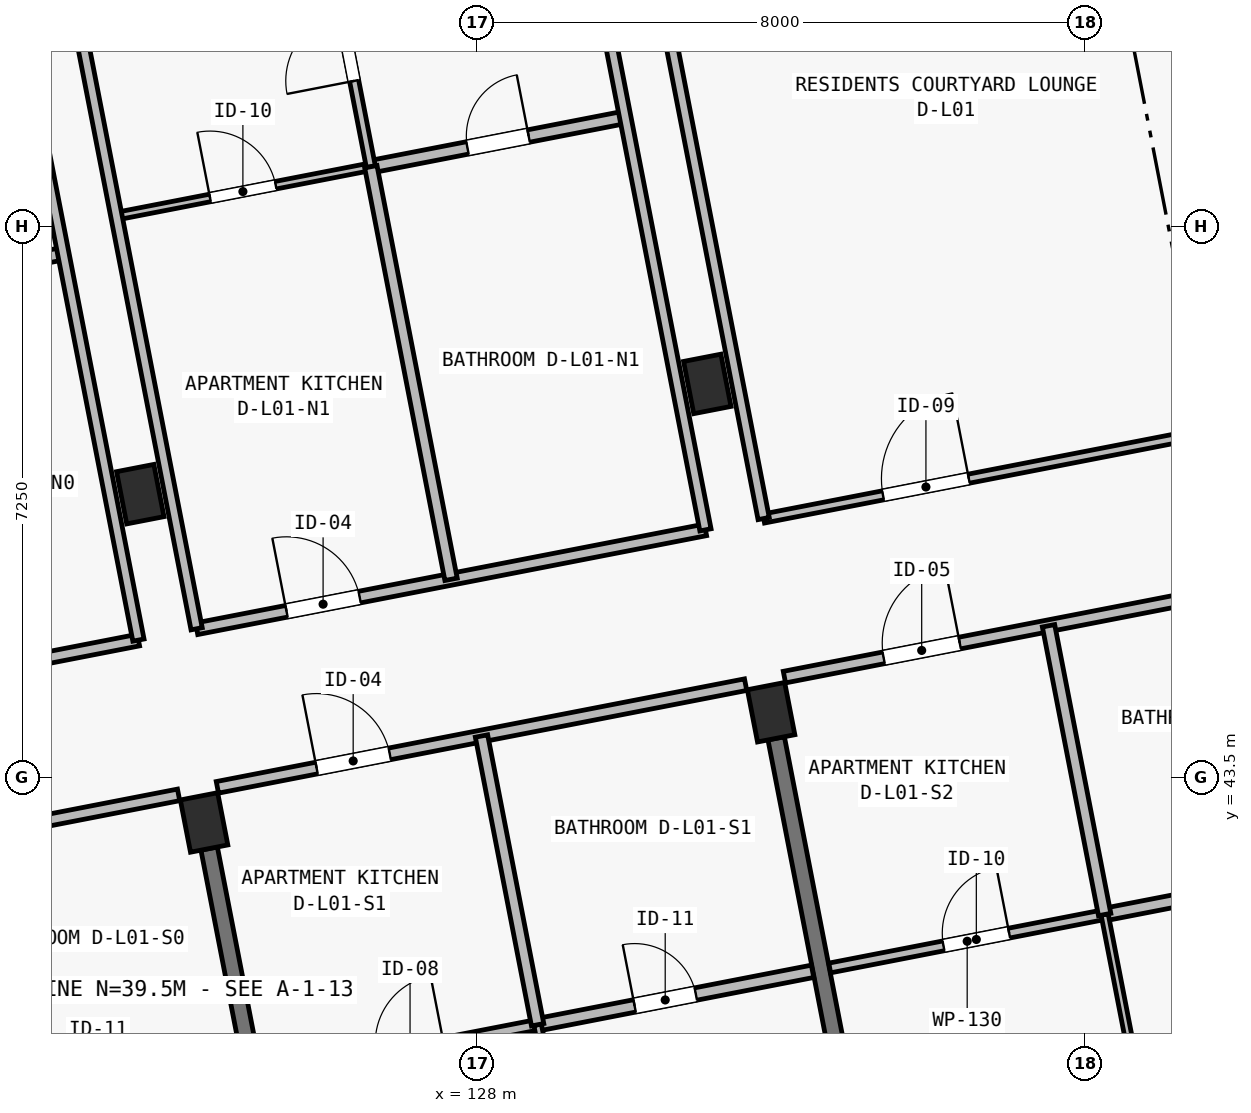
"""IFC4 building model, lengths in metres.
Left out: names, types, materials, properties, quantities, classifications, styles, units other than length and angle.
Written with IfcOpenShell. Run it as: python <this file> out.ifc"""

import sys

from ifc_helpers import new_model, si_unit, direction, frame, frame_2d, origin, origin_2d, place, context, subcontext, project, spatial, rectangle, extrude, element, fill, save


model = new_model("IFC4")
c1 = context("Model", 3, precision=1e-05, world=origin(), true_north=direction((0.0, 1.0)))
c2 = subcontext(c1, "Body", "Model", "MODEL_VIEW")
j1 = project(units=[si_unit("LENGTHUNIT", "METRE"), si_unit("PLANEANGLEUNIT", "RADIAN")], contexts=[c1])
p1 = place(None, origin())
s1 = spatial("IfcSite", under=j1, at=p1, CompositionType="ELEMENT")
p2 = place(p1, origin())
s2 = spatial("IfcBuilding", under=s1, at=p2, CompositionType="ELEMENT")
p3 = place(p2, frame((0.0, 0.0, 4.5)))
s3 = spatial("IfcBuildingStorey", under=s2, at=p3, CompositionType="ELEMENT", Elevation=4.5)
for number, where, z_axis, x_axis in (
    (1, (124.41, 42.91, 0.0), (0.0, 0.0, 1.0), (0.982, 0.191, 0.0)),
    (2, (123.571, 47.23, 0.0), (0.0, 0.0, 1.0), (0.982, 0.191, 0.0)),
    (3, (131.871, 44.361, 0.0), (0.0, 0.0, 1.0), (0.982, 0.191, 0.0)),
    (4, (131.031, 48.68, 0.0), (0.0, 0.0, 1.0), (0.982, 0.191, 0.0)),
):
    element("IfcColumn", number, at=place(p3, frame(where, z_axis=z_axis, x_axis=x_axis)), inside=s3, PredefinedType="COLUMN", context=c2, shape_type="SweptSolid", body=[
        extrude(rectangle(XDim=0.5, YDim=0.7, at=origin_2d()), origin(), (0.0, 0.0, 1.0), 3.9),
    ])
for number, where, z_axis, x_axis in (
    (5, (125.794, 35.794, -0.25), (0.0, 0.0, 1.0), (-0.191, 0.982, 0.0)),
    (6, (133.254, 37.244, -0.25), (0.0, 0.0, 1.0), (-0.191, 0.982, 0.0)),
):
    element("IfcWall", number, at=place(p3, frame(where, z_axis=z_axis, x_axis=x_axis)), inside=s3, PredefinedType="SHEAR", context=c2, shape_type="SweptSolid", body=[
        extrude(rectangle(XDim=6.9, YDim=0.22, at=frame_2d((3.45, 0.0))), origin(), (0.0, 0.0, 1.0), 3.4),
    ])
p4 = place(p3, frame((116.482, 41.797, 0.0), z_axis=(0.0, 0.0, 1.0), x_axis=(0.981629678105, 0.190796161028, 0.0)))
e7 = element("IfcWall", 7, at=p4, inside=s3, PredefinedType="PARTITIONING", context=c2, shape_type="SweptSolid", body=[
    extrude(rectangle(XDim=7.735, YDim=0.155, at=frame_2d((3.868, 0.0))), origin(), (0.0, 0.0, 1.0), 3.62),
])
p5 = place(p4, frame((1.985, 0.0, 0.0)))
e8 = element("IfcOpeningElement", 8, at=p5, cuts=e7, PredefinedType="OPENING", context=c2, shape_type="SweptSolid", body=[
    extrude(rectangle(XDim=1.02, YDim=2.2, at=frame_2d((0.51, 1.1))), frame((0.0, 0.093, 0.0), z_axis=(0.0, -1.0, 0.0), x_axis=(1.0, 0.0, 0.0)), (0.0, 0.0, 1.0), 0.185),
])
p6 = place(p3, frame((124.585, 43.372, 0.0), z_axis=(0.0, 0.0, 1.0), x_axis=(0.9816234647, 0.190828125677, 0.0)))
e9 = element("IfcWall", 9, at=p6, inside=s3, PredefinedType="PARTITIONING", context=c2, shape_type="SweptSolid", body=[
    extrude(rectangle(XDim=7.08, YDim=0.155, at=frame_2d((3.54, 0.0))), origin(), (0.0, 0.0, 1.0), 3.62),
])
p7 = place(p6, frame((1.33, 0.0, 0.0)))
e10 = element("IfcOpeningElement", 10, at=p7, cuts=e9, PredefinedType="OPENING", context=c2, shape_type="SweptSolid", body=[
    extrude(rectangle(XDim=0.98, YDim=2.15, at=frame_2d((0.49, 1.075))), frame((0.0, 0.093, 0.0), z_axis=(0.0, -1.0, 0.0), x_axis=(1.0, 0.0, 0.0)), (0.0, 0.0, 1.0), 0.185),
])
p8 = place(p3, frame((125.181, 39.546, 0.0), z_axis=(0.0, 0.0, 1.0), x_axis=(0.981626422232, 0.190812911449, 0.0)))
e11 = element("IfcWall", 11, at=p8, inside=s3, PredefinedType="PARTITIONING", context=c2, shape_type="SweptSolid", body=[
    extrude(rectangle(XDim=3.685, YDim=0.14, at=frame_2d((1.842, 0.0))), origin(), (0.0, 0.0, 1.0), 3.62),
])
p9 = place(p8, frame((1.525, 0.0, 0.0)))
e12 = element("IfcOpeningElement", 12, at=p9, cuts=e11, PredefinedType="OPENING", context=c2, shape_type="SweptSolid", body=[
    extrude(rectangle(XDim=0.9, YDim=2.1, at=frame_2d((0.45, 1.05))), frame((0.0, 0.085, 0.0), z_axis=(0.0, -1.0, 0.0), x_axis=(1.0, 0.0, 0.0)), (0.0, 0.0, 1.0), 0.17),
])
p10 = place(p3, frame((128.799, 40.249, 0.0), z_axis=(0.0, 0.0, 1.0), x_axis=(0.981628834294, 0.190800502313, 0.0)))
e13 = element("IfcWall", 13, at=p10, inside=s3, PredefinedType="PLUMBINGWALL", context=c2, shape_type="SweptSolid", body=[
    extrude(rectangle(XDim=3.685, YDim=0.165, at=frame_2d((1.843, 0.0))), origin(), (0.0, 0.0, 1.0), 3.62),
])
p11 = place(p10, frame((1.3, 0.0, 0.0)))
e14 = element("IfcOpeningElement", 14, at=p11, cuts=e13, PredefinedType="OPENING", context=c2, shape_type="SweptSolid", body=[
    extrude(rectangle(XDim=0.82, YDim=2.08, at=frame_2d((0.41, 1.04))), frame((0.0, 0.097, 0.0), z_axis=(0.0, -1.0, 0.0), x_axis=(1.0, 0.0, 0.0)), (0.0, 0.0, 1.0), 0.195),
])
p12 = place(p3, frame((129.665, 35.792, 0.0), z_axis=(0.0, 0.0, 1.0), x_axis=(-0.190849508215, 0.981619307682, 0.0)))
e15 = element("IfcWall", 15, at=p12, inside=s3, PredefinedType="PARTITIONING", context=c2, shape_type="SweptSolid", body=[
    extrude(rectangle(XDim=4.54, YDim=0.1, at=frame_2d((2.27, 0.0))), origin(), (0.0, 0.0, 1.0), 3.62),
])
p13 = place(p12, frame((1.35, 0.0, 0.0)))
e16 = element("IfcOpeningElement", 16, at=p13, cuts=e15, PredefinedType="OPENING", context=c2, shape_type="SweptSolid", body=[
    extrude(rectangle(XDim=0.88, YDim=2.1, at=frame_2d((0.44, 1.05))), frame((0.0, 0.065, 0.0), z_axis=(0.0, -1.0, 0.0), x_axis=(1.0, 0.0, 0.0)), (0.0, 0.0, 1.0), 0.13),
])
p14 = place(p3, frame((128.799, 40.249, 0.0), z_axis=(0.0, 0.0, 1.0), x_axis=(-0.190775098069, 0.981633771809, 0.0)))
e17 = element("IfcWall", 17, at=p14, inside=s3, PredefinedType="PLUMBINGWALL", context=c2, shape_type="SweptSolid", body=[
    extrude(rectangle(XDim=3.87, YDim=0.165, at=frame_2d((1.935, 0.0))), origin(), (0.0, 0.0, 1.0), 3.62),
])
p15 = place(p3, frame((132.046, 44.823, 0.0), z_axis=(0.0, 0.0, 1.0), x_axis=(0.9816234647, 0.190828125677, 0.0)))
e18 = element("IfcWall", 18, at=p15, inside=s3, PredefinedType="PARTITIONING", context=c2, shape_type="SweptSolid", body=[
    extrude(rectangle(XDim=7.08, YDim=0.155, at=frame_2d((3.54, 0.0))), origin(), (0.0, 0.0, 1.0), 3.62),
])
p16 = place(p15, frame((1.33, 0.0, 0.0)))
e19 = element("IfcOpeningElement", 19, at=p16, cuts=e18, PredefinedType="OPENING", context=c2, shape_type="SweptSolid", body=[
    extrude(rectangle(XDim=1.02, YDim=2.2, at=frame_2d((0.51, 1.1))), frame((0.0, 0.093, 0.0), z_axis=(0.0, -1.0, 0.0), x_axis=(1.0, 0.0, 0.0)), (0.0, 0.0, 1.0), 0.185),
])
p17 = place(p3, frame((132.642, 40.996, 0.0), z_axis=(0.0, 0.0, 1.0), x_axis=(0.981626422232, 0.190812911449, 0.0)))
e20 = element("IfcWall", 20, at=p17, inside=s3, PredefinedType="PARTITIONING", context=c2, shape_type="SweptSolid", body=[
    extrude(rectangle(XDim=3.685, YDim=0.13, at=frame_2d((1.842, 0.0))), origin(), (0.0, 0.0, 1.0), 3.62),
])
p18 = place(p17, frame((1.525, 0.0, 0.0)))
e21 = element("IfcOpeningElement", 21, at=p18, cuts=e20, PredefinedType="OPENING", context=c2, shape_type="SweptSolid", body=[
    extrude(rectangle(XDim=0.88, YDim=2.1, at=frame_2d((0.44, 1.05))), frame((0.0, 0.08, 0.0), z_axis=(0.0, -1.0, 0.0), x_axis=(1.0, 0.0, 0.0)), (0.0, 0.0, 1.0), 0.16),
])
p19 = place(p3, frame((136.259, 41.699, 0.0), z_axis=(0.0, 0.0, 1.0), x_axis=(0.981628834294, 0.190800502313, 0.0)))
e22 = element("IfcWall", 22, at=p19, inside=s3, PredefinedType="PLUMBINGWALL", context=c2, shape_type="SweptSolid", body=[
    extrude(rectangle(XDim=3.685, YDim=0.165, at=frame_2d((1.843, 0.0))), origin(), (0.0, 0.0, 1.0), 3.62),
])
p20 = place(p19, frame((1.3, 0.0, 0.0)))
e23 = element("IfcOpeningElement", 23, at=p20, cuts=e22, PredefinedType="OPENING", context=c2, shape_type="SweptSolid", body=[
    extrude(rectangle(XDim=0.82, YDim=2.08, at=frame_2d((0.41, 1.04))), frame((0.0, 0.097, 0.0), z_axis=(0.0, -1.0, 0.0), x_axis=(1.0, 0.0, 0.0)), (0.0, 0.0, 1.0), 0.195),
])
p21 = place(p3, frame((137.125, 37.242, 0.0), z_axis=(0.0, 0.0, 1.0), x_axis=(-0.190787619192, 0.981631338316, 0.0)))
e24 = element("IfcWall", 24, at=p21, inside=s3, PredefinedType="PARTITIONING", context=c2, shape_type="SweptSolid", body=[
    extrude(rectangle(XDim=4.54, YDim=0.095, at=frame_2d((2.27, 0.0))), origin(), (0.0, 0.0, 1.0), 3.62),
])
p22 = place(p21, frame((1.35, 0.0, 0.0)))
e25 = element("IfcOpeningElement", 25, at=p22, cuts=e24, PredefinedType="OPENING", context=c2, shape_type="SweptSolid", body=[
    extrude(rectangle(XDim=0.9, YDim=2.1, at=frame_2d((0.45, 1.05))), frame((0.0, 0.062, 0.0), z_axis=(0.0, -1.0, 0.0), x_axis=(1.0, 0.0, 0.0)), (0.0, 0.0, 1.0), 0.125),
])
p23 = place(p3, frame((136.259, 41.699, 0.0), z_axis=(0.0, 0.0, 1.0), x_axis=(-0.190835887914, 0.981621955686, 0.0)))
e26 = element("IfcWall", 26, at=p23, inside=s3, PredefinedType="PLUMBINGWALL", context=c2, shape_type="SweptSolid", body=[
    extrude(rectangle(XDim=3.87, YDim=0.165, at=frame_2d((1.935, 0.0))), origin(), (0.0, 0.0, 1.0), 3.62),
])
p24 = place(p3, frame((116.852, 44.009, 0.0), z_axis=(0.0, 0.0, 1.0), x_axis=(0.981629173664, 0.190798756314, 0.0)))
e27 = element("IfcWall", 27, at=p24, inside=s3, PredefinedType="PARTITIONING", context=c2, shape_type="SweptSolid", body=[
    extrude(rectangle(XDim=6.82, YDim=0.155, at=frame_2d((3.41, 0.0))), origin(), (0.0, 0.0, 1.0), 3.62),
])
p25 = place(p24, frame((1.205, 0.0, 0.0)))
e28 = element("IfcOpeningElement", 28, at=p25, cuts=e27, PredefinedType="OPENING", context=c2, shape_type="SweptSolid", body=[
    extrude(rectangle(XDim=1.02, YDim=2.2, at=frame_2d((0.51, 1.1))), frame((0.0, 0.093, 0.0), z_axis=(0.0, -1.0, 0.0), x_axis=(1.0, 0.0, 0.0)), (0.0, 0.0, 1.0), 0.185),
])
p26 = place(p3, frame((119.211, 49.744, 0.0), z_axis=(0.0, 0.0, 1.0), x_axis=(0.981629173664, 0.190798756314, 0.0)))
e29 = element("IfcWall", 29, at=p26, inside=s3, PredefinedType="PLUMBINGWALL", context=c2, shape_type="SweptSolid", body=[
    extrude(rectangle(XDim=3.41, YDim=0.165, at=frame_2d((1.705, 0.0))), origin(), (0.0, 0.0, 1.0), 3.62),
])
p27 = place(p26, frame((1.295, 0.0, 0.0)))
e30 = element("IfcOpeningElement", 30, at=p27, cuts=e29, PredefinedType="OPENING", context=c2, shape_type="SweptSolid", body=[
    extrude(rectangle(XDim=0.82, YDim=2.08, at=frame_2d((0.41, 1.04))), frame((0.0, 0.097, 0.0), z_axis=(0.0, -1.0, 0.0), x_axis=(1.0, 0.0, 0.0)), (0.0, 0.0, 1.0), 0.195),
])
p28 = place(p3, frame((123.547, 45.31, 0.0), z_axis=(0.0, 0.0, 1.0), x_axis=(-0.190809410863, 0.981627102685, 0.0)))
e31 = element("IfcWall", 31, at=p28, inside=s3, PredefinedType="PARTITIONING", context=c2, shape_type="SweptSolid", body=[
    extrude(rectangle(XDim=9.87, YDim=0.15, at=frame_2d((4.935, 0.0))), origin(), (0.0, 0.0, 1.0), 3.62),
])
p29 = place(p3, frame((124.312, 45.459, 0.0), z_axis=(0.0, 0.0, 1.0), x_axis=(0.981627870431, 0.190805461121, 0.0)))
e32 = element("IfcWall", 32, at=p29, inside=s3, PredefinedType="PARTITIONING", context=c2, shape_type="SweptSolid", body=[
    extrude(rectangle(XDim=6.82, YDim=0.155, at=frame_2d((3.41, 0.0))), origin(), (0.0, 0.0, 1.0), 3.62),
])
p30 = place(p29, frame((1.205, 0.0, 0.0)))
e33 = element("IfcOpeningElement", 33, at=p30, cuts=e32, PredefinedType="OPENING", context=c2, shape_type="SweptSolid", body=[
    extrude(rectangle(XDim=0.98, YDim=2.15, at=frame_2d((0.49, 1.075))), frame((0.0, 0.093, 0.0), z_axis=(0.0, -1.0, 0.0), x_axis=(1.0, 0.0, 0.0)), (0.0, 0.0, 1.0), 0.185),
])
p31 = place(p3, frame((123.257, 50.887, 0.0), z_axis=(0.0, 0.0, 1.0), x_axis=(0.981629173664, 0.190798756314, 0.0)))
e34 = element("IfcWall", 34, at=p31, inside=s3, PredefinedType="PARTITIONING", context=c2, shape_type="SweptSolid", body=[
    extrude(rectangle(XDim=3.41, YDim=0.1, at=frame_2d((1.705, 0.0))), origin(), (0.0, 0.0, 1.0), 3.62),
])
p32 = place(p31, frame((1.255, 0.0, 0.0)))
e35 = element("IfcOpeningElement", 35, at=p32, cuts=e34, PredefinedType="OPENING", context=c2, shape_type="SweptSolid", body=[
    extrude(rectangle(XDim=0.88, YDim=2.1, at=frame_2d((0.44, 1.05))), frame((0.0, 0.065, 0.0), z_axis=(0.0, -1.0, 0.0), x_axis=(1.0, 0.0, 0.0)), (0.0, 0.0, 1.0), 0.13),
])
p33 = place(p3, frame((126.604, 51.538, 0.0), z_axis=(0.0, 0.0, 1.0), x_axis=(0.98162656706, 0.190812166391, 0.0)))
e36 = element("IfcWall", 36, at=p33, inside=s3, PredefinedType="PLUMBINGWALL", context=c2, shape_type="SweptSolid", body=[
    extrude(rectangle(XDim=3.41, YDim=0.165, at=frame_2d((1.705, 0.0))), origin(), (0.0, 0.0, 1.0), 3.62),
])
p34 = place(p33, frame((1.295, 0.0, 0.0)))
e37 = element("IfcOpeningElement", 37, at=p34, cuts=e36, PredefinedType="OPENING", context=c2, shape_type="SweptSolid", body=[
    extrude(rectangle(XDim=0.82, YDim=2.08, at=frame_2d((0.41, 1.04))), frame((0.0, 0.097, 0.0), z_axis=(0.0, -1.0, 0.0), x_axis=(1.0, 0.0, 0.0)), (0.0, 0.0, 1.0), 0.195),
])
p35 = place(p3, frame((126.604, 51.538, 0.0), z_axis=(0.0, 0.0, 1.0), x_axis=(-0.190812443151, 0.981626513262, 0.0)))
e38 = element("IfcWall", 38, at=p35, inside=s3, PredefinedType="PARTITIONING", context=c2, shape_type="SweptSolid", body=[
    extrude(rectangle(XDim=4.34, YDim=0.12, at=frame_2d((2.17, 0.0))), origin(), (0.0, 0.0, 1.0), 3.62),
])
p36 = place(p35, frame((1.15, 0.0, 0.0)))
e39 = element("IfcOpeningElement", 39, at=p36, cuts=e38, PredefinedType="OPENING", context=c2, shape_type="SweptSolid", body=[
    extrude(rectangle(XDim=0.9, YDim=2.1, at=frame_2d((0.45, 1.05))), frame((0.0, 0.075, 0.0), z_axis=(0.0, -1.0, 0.0), x_axis=(1.0, 0.0, 0.0)), (0.0, 0.0, 1.0), 0.15),
])
p37 = place(p3, frame((127.66, 46.109, 0.0), z_axis=(0.0, 0.0, 1.0), x_axis=(-0.190815300433, 0.981625957848, 0.0)))
e40 = element("IfcWall", 40, at=p37, inside=s3, PredefinedType="PLUMBINGWALL", context=c2, shape_type="SweptSolid", body=[
    extrude(rectangle(XDim=5.53, YDim=0.165, at=frame_2d((2.765, 0.0))), origin(), (0.0, 0.0, 1.0), 3.62),
])
p38 = place(p3, frame((124.312, 45.459, 0.0), z_axis=(0.0, 0.0, 1.0), x_axis=(-0.190814044018, 0.981626202078, 0.0)))
e41 = element("IfcWall", 41, at=p38, inside=s3, PredefinedType="PARTITIONING", context=c2, shape_type="SweptSolid", body=[
    extrude(rectangle(XDim=9.87, YDim=0.15, at=frame_2d((4.935, 0.0))), origin(), (0.0, 0.0, 1.0), 3.62),
])
p39 = place(p3, frame((131.007, 46.76, 0.0), z_axis=(0.0, 0.0, 1.0), x_axis=(-0.190809410863, 0.981627102685, 0.0)))
e42 = element("IfcWall", 42, at=p39, inside=s3, PredefinedType="PARTITIONING", context=c2, shape_type="SweptSolid", body=[
    extrude(rectangle(XDim=9.87, YDim=0.15, at=frame_2d((4.935, 0.0))), origin(), (0.0, 0.0, 1.0), 3.62),
])
p40 = place(p3, frame((131.772, 46.909, 0.0), z_axis=(0.0, 0.0, 1.0), x_axis=(0.981622468528, 0.190833249935, 0.0)))
e43 = element("IfcWall", 43, at=p40, inside=s3, PredefinedType="PARTITIONING", context=c2, shape_type="SweptSolid", body=[
    extrude(rectangle(XDim=6.82, YDim=0.12, at=frame_2d((3.41, 0.0))), origin(), (0.0, 0.0, 1.0), 3.62),
])
p41 = place(p40, frame((1.6, 0.0, 0.0)))
e44 = element("IfcOpeningElement", 44, at=p41, cuts=e43, PredefinedType="OPENING", context=c2, shape_type="SweptSolid", body=[
    extrude(rectangle(XDim=1.15, YDim=2.15, at=frame_2d((0.575, 1.075))), frame((0.0, 0.075, 0.0), z_axis=(0.0, -1.0, 0.0), x_axis=(1.0, 0.0, 0.0)), (0.0, 0.0, 1.0), 0.15),
])
p42 = place(p3, frame((131.772, 46.909, 0.0), z_axis=(0.0, 0.0, 1.0), x_axis=(-0.1907855758, 0.981631735462, 0.0)))
e45 = element("IfcWall", 45, at=p42, inside=s3, PredefinedType="PARTITIONING", context=c2, shape_type="SweptSolid", body=[
    extrude(rectangle(XDim=9.87, YDim=0.15, at=frame_2d((4.935, 0.0))), origin(), (0.0, 0.0, 1.0), 3.62),
])
p43 = place(p3, frame((138.467, 48.21, 0.0), z_axis=(0.0, 0.0, 1.0), x_axis=(-0.190814044018, 0.981626202078, 0.0)))
e46 = element("IfcWall", 46, at=p43, inside=s3, PredefinedType="PARTITIONING", context=c2, shape_type="SweptSolid", body=[
    extrude(rectangle(XDim=9.87, YDim=0.15, at=frame_2d((4.935, 0.0))), origin(), (0.0, 0.0, 1.0), 3.62),
])
p44 = place(p7, origin())
e47 = element("IfcDoor", 47, at=p44, inside=s3, OperationType="SINGLE_SWING_LEFT", PredefinedType="DOOR", context=c2, shape_type="SweptSolid", body=[
    extrude(rectangle(XDim=0.98, YDim=2.15, at=frame_2d((0.49, 1.075))), frame((0.0, 0.025, 0.0), z_axis=(0.0, -1.0, 0.0), x_axis=(1.0, 0.0, 0.0)), (0.0, 0.0, 1.0), 0.05),
])
fill(e10, e47)
p45 = place(p11, origin())
e48 = element("IfcDoor", 48, at=p45, inside=s3, OperationType="SINGLE_SWING_LEFT", PredefinedType="DOOR", context=c2, shape_type="SweptSolid", body=[
    extrude(rectangle(XDim=0.82, YDim=2.08, at=frame_2d((0.41, 1.04))), frame((0.0, 0.025, 0.0), z_axis=(0.0, -1.0, 0.0), x_axis=(1.0, 0.0, 0.0)), (0.0, 0.0, 1.0), 0.05),
])
fill(e14, e48)
p46 = place(p16, origin())
e49 = element("IfcDoor", 49, at=p46, inside=s3, OperationType="SINGLE_SWING_RIGHT", PredefinedType="DOOR", context=c2, shape_type="SweptSolid", body=[
    extrude(rectangle(XDim=1.02, YDim=2.2, at=frame_2d((0.51, 1.1))), frame((0.0, 0.025, 0.0), z_axis=(0.0, -1.0, 0.0), x_axis=(1.0, 0.0, 0.0)), (0.0, 0.0, 1.0), 0.05),
])
fill(e19, e49)
p47 = place(p18, origin())
e50 = element("IfcDoor", 50, at=p47, inside=s3, OperationType="SINGLE_SWING_RIGHT", PredefinedType="DOOR", context=c2, shape_type="SweptSolid", body=[
    extrude(rectangle(XDim=0.88, YDim=2.1, at=frame_2d((0.44, 1.05))), frame((0.0, 0.025, 0.0), z_axis=(0.0, -1.0, 0.0), x_axis=(1.0, 0.0, 0.0)), (0.0, 0.0, 1.0), 0.05),
])
fill(e21, e50)
p48 = place(p30, origin())
e51 = element("IfcDoor", 51, at=p48, inside=s3, OperationType="SINGLE_SWING_LEFT", PredefinedType="DOOR", context=c2, shape_type="SweptSolid", body=[
    extrude(rectangle(XDim=0.98, YDim=2.15, at=frame_2d((0.49, 1.075))), frame((0.0, 0.025, 0.0), z_axis=(0.0, -1.0, 0.0), x_axis=(1.0, 0.0, 0.0)), (0.0, 0.0, 1.0), 0.05),
])
fill(e33, e51)
p49 = place(p32, origin())
e52 = element("IfcDoor", 52, at=p49, inside=s3, OperationType="SINGLE_SWING_LEFT", PredefinedType="DOOR", context=c2, shape_type="SweptSolid", body=[
    extrude(rectangle(XDim=0.88, YDim=2.1, at=frame_2d((0.44, 1.05))), frame((0.0, 0.025, 0.0), z_axis=(0.0, -1.0, 0.0), x_axis=(1.0, 0.0, 0.0)), (0.0, 0.0, 1.0), 0.05),
])
fill(e35, e52)
p50 = place(p34, origin())
e53 = element("IfcDoor", 53, at=p50, inside=s3, OperationType="SINGLE_SWING_RIGHT", PredefinedType="DOOR", context=c2, shape_type="SweptSolid", body=[
    extrude(rectangle(XDim=0.82, YDim=2.08, at=frame_2d((0.41, 1.04))), frame((0.0, 0.025, 0.0), z_axis=(0.0, -1.0, 0.0), x_axis=(1.0, 0.0, 0.0)), (0.0, 0.0, 1.0), 0.05),
])
fill(e37, e53)
p51 = place(p36, origin())
e54 = element("IfcDoor", 54, at=p51, inside=s3, OperationType="SINGLE_SWING_LEFT", PredefinedType="DOOR", context=c2, shape_type="SweptSolid", body=[
    extrude(rectangle(XDim=0.9, YDim=2.1, at=frame_2d((0.45, 1.05))), frame((0.0, 0.025, 0.0), z_axis=(0.0, -1.0, 0.0), x_axis=(1.0, 0.0, 0.0)), (0.0, 0.0, 1.0), 0.05),
])
fill(e39, e54)
p52 = place(p41, origin())
e55 = element("IfcDoor", 55, at=p52, inside=s3, OperationType="SINGLE_SWING_RIGHT", PredefinedType="DOOR", context=c2, shape_type="SweptSolid", body=[
    extrude(rectangle(XDim=1.15, YDim=2.15, at=frame_2d((0.575, 1.075))), frame((0.0, 0.025, 0.0), z_axis=(0.0, -1.0, 0.0), x_axis=(1.0, 0.0, 0.0)), (0.0, 0.0, 1.0), 0.05),
])
fill(e44, e55)
save(model, sys.argv[1])
